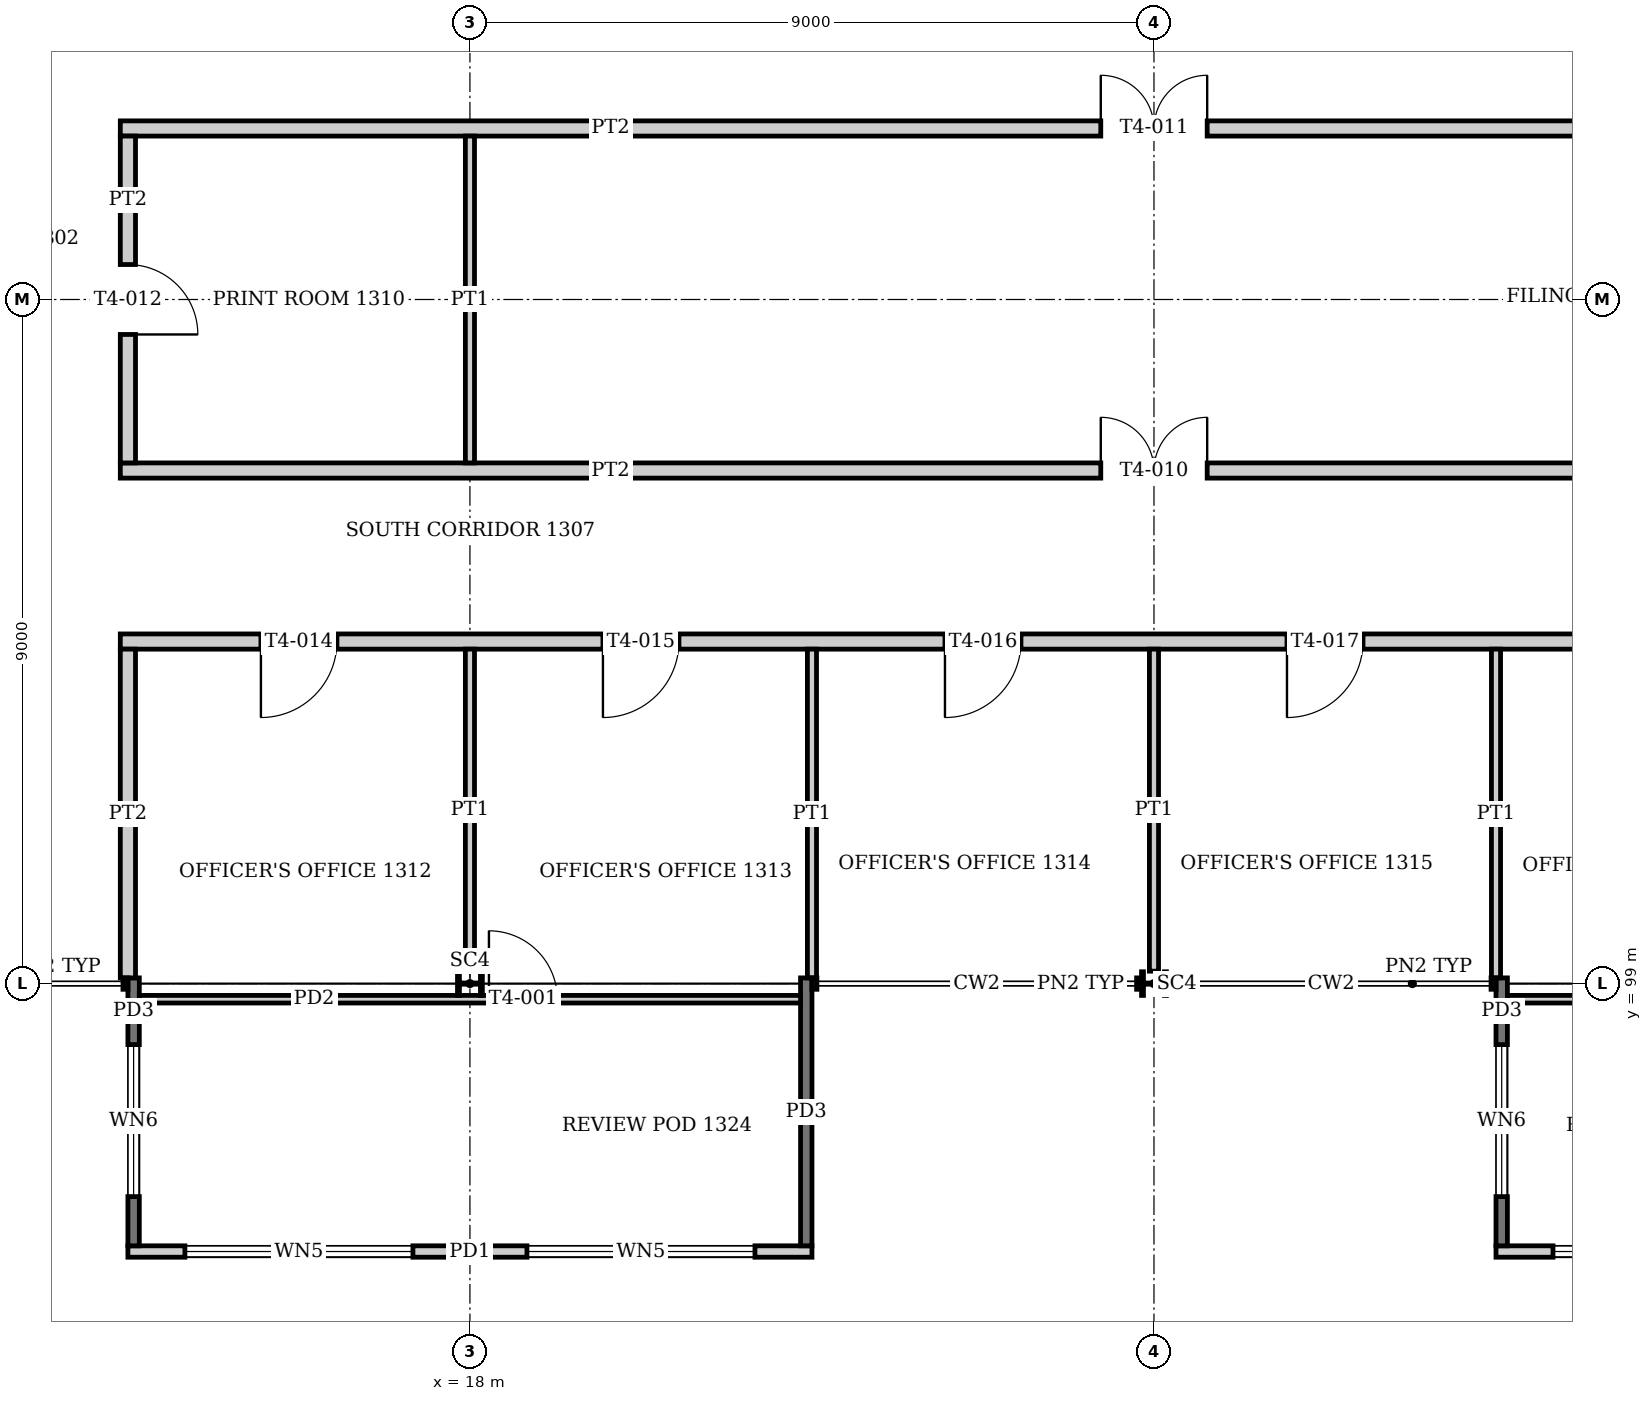
"""IFC4 building model, lengths in metres.
Left out: names, types, materials, properties, quantities, classifications, styles, units other than length and angle.
Written with IfcOpenShell. Run it as: python <this file> out.ifc"""

import sys

from ifc_helpers import new_model, si_unit, direction, frame, frame_2d, origin, origin_2d, place, context, subcontext, project, spatial, rectangle, i_section, extrude, element, fill, save


model = new_model("IFC4")
c1 = context("Model", 3, precision=1e-05, world=origin(), true_north=direction((0.0, 1.0)))
c2 = subcontext(c1, "Body", "Model", "MODEL_VIEW")
j1 = project(units=[si_unit("LENGTHUNIT", "METRE"), si_unit("PLANEANGLEUNIT", "RADIAN")], contexts=[c1])
p1 = place(None, origin())
s1 = spatial("IfcSite", under=j1, at=p1, CompositionType="ELEMENT")
p2 = place(p1, origin())
s2 = spatial("IfcBuilding", under=s1, at=p2, CompositionType="ELEMENT")
p3 = place(p2, frame((0.0, 0.0, 55.2)))
s3 = spatial("IfcBuildingStorey", under=s2, at=p3, CompositionType="ELEMENT", Elevation=55.2)
for number, where, z_axis, x_axis in (
    (1, (18.0, 99.0, 0.0), (0.0, 0.0, 1.0), (0.0, 1.0, 0.0)),
    (2, (27.0, 99.0, 0.0), (0.0, 0.0, 1.0), (0.0, 1.0, 0.0)),
):
    element("IfcColumn", number, at=place(p3, frame(where, z_axis=z_axis, x_axis=x_axis)), inside=s3, PredefinedType="COLUMN", context=c2, shape_type="SweptSolid", body=[
        extrude(i_section(OverallWidth=0.311, OverallDepth=0.327, WebThickness=0.016, FlangeThickness=0.025, at=origin_2d()), origin(), (0.0, 0.0, 1.0), 4.0),
    ])
p4 = place(p3, frame((13.5, 95.475, 0.0), z_axis=(0.0, 0.0, 1.0), x_axis=(1.0, 0.0, 0.0)))
e3 = element("IfcWall", 3, at=p4, inside=s3, PredefinedType="SOLIDWALL", context=c2, shape_type="SweptSolid", body=[
    extrude(rectangle(XDim=9.0, YDim=0.15, at=frame_2d((4.5, 0.0))), origin(), (0.0, 0.0, 1.0), 2.6),
])
p5 = place(p4, frame((0.75, 0.0, 0.9)))
e4 = element("IfcOpeningElement", 4, at=p5, cuts=e3, PredefinedType="OPENING", context=c2, shape_type="SweptSolid", body=[
    extrude(rectangle(XDim=3.0, YDim=1.4, at=frame_2d((1.5, 0.7))), frame((0.0, 0.085, 0.0), z_axis=(0.0, -1.0, 0.0), x_axis=(1.0, 0.0, 0.0)), (0.0, 0.0, 1.0), 0.17),
])
p6 = place(p4, frame((5.25, 0.0, 0.9)))
e5 = element("IfcOpeningElement", 5, at=p6, cuts=e3, PredefinedType="OPENING", context=c2, shape_type="SweptSolid", body=[
    extrude(rectangle(XDim=3.0, YDim=1.4, at=frame_2d((1.5, 0.7))), frame((0.0, 0.085, 0.0), z_axis=(0.0, -1.0, 0.0), x_axis=(1.0, 0.0, 0.0)), (0.0, 0.0, 1.0), 0.17),
])
p7 = place(p3, frame((13.575, 95.55, -0.15), z_axis=(0.0, 0.0, 1.0), x_axis=(0.0, 1.0, 0.0)))
e6 = element("IfcWall", 6, at=p7, inside=s3, PredefinedType="SOLIDWALL", context=c2, shape_type="SweptSolid", body=[
    extrude(rectangle(XDim=3.525, YDim=0.15, at=frame_2d((1.762, 0.0))), origin(), (0.0, 0.0, 1.0), 2.75),
])
p8 = place(p7, frame((0.647, 0.0, 1.05)))
e7 = element("IfcOpeningElement", 7, at=p8, cuts=e6, PredefinedType="OPENING", context=c2, shape_type="SweptSolid", body=[
    extrude(rectangle(XDim=2.0, YDim=1.4, at=frame_2d((1.0, 0.7))), frame((0.0, 0.085, 0.0), z_axis=(0.0, -1.0, 0.0), x_axis=(1.0, 0.0, 0.0)), (0.0, 0.0, 1.0), 0.17),
])
p9 = place(p3, frame((22.425, 95.55, -0.15), z_axis=(0.0, 0.0, 1.0), x_axis=(0.0, 1.0, 0.0)))
e8 = element("IfcWall", 8, at=p9, inside=s3, PredefinedType="SOLIDWALL", context=c2, shape_type="SweptSolid", body=[
    extrude(rectangle(XDim=3.525, YDim=0.15, at=frame_2d((1.762, 0.0))), origin(), (0.0, 0.0, 1.0), 2.75),
])
p10 = place(p3, frame((13.65, 98.794, 0.0), z_axis=(0.0, 0.0, 1.0), x_axis=(1.0, 0.0, 0.0)))
e9 = element("IfcWall", 9, at=p10, inside=s3, PredefinedType="PARTITIONING", context=c2, shape_type="SweptSolid", body=[
    extrude(rectangle(XDim=8.7, YDim=0.1, at=frame_2d((4.35, 0.0))), origin(), (0.0, 0.0, 1.0), 2.6),
])
p11 = place(p10, frame((4.6, 0.0, 0.0)))
e10 = element("IfcOpeningElement", 10, at=p11, cuts=e9, PredefinedType="OPENING", context=c2, shape_type="SweptSolid", body=[
    extrude(rectangle(XDim=0.9, YDim=2.1, at=frame_2d((0.45, 1.05))), frame((0.0, 0.06, 0.0), z_axis=(0.0, -1.0, 0.0), x_axis=(1.0, 0.0, 0.0)), (0.0, 0.0, 1.0), 0.12),
])
p12 = place(p3, frame((31.5, 95.475, 0.0), z_axis=(0.0, 0.0, 1.0), x_axis=(1.0, 0.0, 0.0)))
e11 = element("IfcWall", 11, at=p12, inside=s3, PredefinedType="SOLIDWALL", context=c2, shape_type="SweptSolid", body=[
    extrude(rectangle(XDim=9.0, YDim=0.15, at=frame_2d((4.5, 0.0))), origin(), (0.0, 0.0, 1.0), 2.6),
])
p13 = place(p12, frame((0.75, 0.0, 0.9)))
e12 = element("IfcOpeningElement", 12, at=p13, cuts=e11, PredefinedType="OPENING", context=c2, shape_type="SweptSolid", body=[
    extrude(rectangle(XDim=3.0, YDim=1.4, at=frame_2d((1.5, 0.7))), frame((0.0, 0.085, 0.0), z_axis=(0.0, -1.0, 0.0), x_axis=(1.0, 0.0, 0.0)), (0.0, 0.0, 1.0), 0.17),
])
p14 = place(p12, frame((5.25, 0.0, 0.9)))
e13 = element("IfcOpeningElement", 13, at=p14, cuts=e11, PredefinedType="OPENING", context=c2, shape_type="SweptSolid", body=[
    extrude(rectangle(XDim=3.0, YDim=1.4, at=frame_2d((1.5, 0.7))), frame((0.0, 0.085, 0.0), z_axis=(0.0, -1.0, 0.0), x_axis=(1.0, 0.0, 0.0)), (0.0, 0.0, 1.0), 0.17),
])
p15 = place(p3, frame((31.575, 95.55, -0.15), z_axis=(0.0, 0.0, 1.0), x_axis=(0.0, 1.0, 0.0)))
e14 = element("IfcWall", 14, at=p15, inside=s3, PredefinedType="SOLIDWALL", context=c2, shape_type="SweptSolid", body=[
    extrude(rectangle(XDim=3.525, YDim=0.15, at=frame_2d((1.762, 0.0))), origin(), (0.0, 0.0, 1.0), 2.75),
])
p16 = place(p15, frame((0.647, 0.0, 1.05)))
e15 = element("IfcOpeningElement", 15, at=p16, cuts=e14, PredefinedType="OPENING", context=c2, shape_type="SweptSolid", body=[
    extrude(rectangle(XDim=2.0, YDim=1.4, at=frame_2d((1.0, 0.7))), frame((0.0, 0.085, 0.0), z_axis=(0.0, -1.0, 0.0), x_axis=(1.0, 0.0, 0.0)), (0.0, 0.0, 1.0), 0.17),
])
p17 = place(p3, frame((31.65, 98.794, 0.0), z_axis=(0.0, 0.0, 1.0), x_axis=(1.0, 0.0, 0.0)))
e16 = element("IfcWall", 16, at=p17, inside=s3, PredefinedType="PARTITIONING", context=c2, shape_type="SweptSolid", body=[
    extrude(rectangle(XDim=8.7, YDim=0.1, at=frame_2d((4.35, 0.0))), origin(), (0.0, 0.0, 1.0), 2.6),
])
p18 = place(p17, frame((4.6, 0.0, 0.0)))
e17 = element("IfcOpeningElement", 17, at=p18, cuts=e16, PredefinedType="OPENING", context=c2, shape_type="SweptSolid", body=[
    extrude(rectangle(XDim=0.9, YDim=2.1, at=frame_2d((0.45, 1.05))), frame((0.0, 0.06, 0.0), z_axis=(0.0, -1.0, 0.0), x_axis=(1.0, 0.0, 0.0)), (0.0, 0.0, 1.0), 0.12),
])
p19 = place(p3, frame((13.4, 103.5, 0.0), z_axis=(0.0, 0.0, 1.0), x_axis=(1.0, 0.0, 0.0)))
e18 = element("IfcWall", 18, at=p19, inside=s3, PredefinedType="PARTITIONING", context=c2, shape_type="SweptSolid", body=[
    extrude(rectangle(XDim=27.2, YDim=0.2, at=frame_2d((13.6, 0.0))), origin(), (0.0, 0.0, 1.0), 3.05),
])
p20 = place(p19, frame((1.85, 0.0, 0.0)))
e19 = element("IfcOpeningElement", 19, at=p20, cuts=e18, PredefinedType="OPENING", context=c2, shape_type="SweptSolid", body=[
    extrude(rectangle(XDim=1.0, YDim=2.1, at=frame_2d((0.5, 1.05))), frame((0.0, 0.11, 0.0), z_axis=(0.0, -1.0, 0.0), x_axis=(1.0, 0.0, 0.0)), (0.0, 0.0, 1.0), 0.22),
])
p21 = place(p19, frame((6.35, 0.0, 0.0)))
e20 = element("IfcOpeningElement", 20, at=p21, cuts=e18, PredefinedType="OPENING", context=c2, shape_type="SweptSolid", body=[
    extrude(rectangle(XDim=1.0, YDim=2.1, at=frame_2d((0.5, 1.05))), frame((0.0, 0.11, 0.0), z_axis=(0.0, -1.0, 0.0), x_axis=(1.0, 0.0, 0.0)), (0.0, 0.0, 1.0), 0.22),
])
p22 = place(p19, frame((10.85, 0.0, 0.0)))
e21 = element("IfcOpeningElement", 21, at=p22, cuts=e18, PredefinedType="OPENING", context=c2, shape_type="SweptSolid", body=[
    extrude(rectangle(XDim=1.0, YDim=2.1, at=frame_2d((0.5, 1.05))), frame((0.0, 0.11, 0.0), z_axis=(0.0, -1.0, 0.0), x_axis=(1.0, 0.0, 0.0)), (0.0, 0.0, 1.0), 0.22),
])
p23 = place(p19, frame((15.35, 0.0, 0.0)))
e22 = element("IfcOpeningElement", 22, at=p23, cuts=e18, PredefinedType="OPENING", context=c2, shape_type="SweptSolid", body=[
    extrude(rectangle(XDim=1.0, YDim=2.1, at=frame_2d((0.5, 1.05))), frame((0.0, 0.11, 0.0), z_axis=(0.0, -1.0, 0.0), x_axis=(1.0, 0.0, 0.0)), (0.0, 0.0, 1.0), 0.22),
])
p24 = place(p19, frame((19.85, 0.0, 0.0)))
e23 = element("IfcOpeningElement", 23, at=p24, cuts=e18, PredefinedType="OPENING", context=c2, shape_type="SweptSolid", body=[
    extrude(rectangle(XDim=1.0, YDim=2.1, at=frame_2d((0.5, 1.05))), frame((0.0, 0.11, 0.0), z_axis=(0.0, -1.0, 0.0), x_axis=(1.0, 0.0, 0.0)), (0.0, 0.0, 1.0), 0.22),
])
p25 = place(p19, frame((24.45, 0.0, 0.0)))
e24 = element("IfcOpeningElement", 24, at=p25, cuts=e18, PredefinedType="OPENING", context=c2, shape_type="SweptSolid", body=[
    extrude(rectangle(XDim=0.8, YDim=2.1, at=frame_2d((0.4, 1.05))), frame((0.0, 0.11, 0.0), z_axis=(0.0, -1.0, 0.0), x_axis=(1.0, 0.0, 0.0)), (0.0, 0.0, 1.0), 0.22),
])
p26 = place(p3, frame((13.4, 105.75, 0.0), z_axis=(0.0, 0.0, 1.0), x_axis=(1.0, 0.0, 0.0)))
e25 = element("IfcWall", 25, at=p26, inside=s3, PredefinedType="PARTITIONING", context=c2, shape_type="SweptSolid", body=[
    extrude(rectangle(XDim=27.2, YDim=0.2, at=frame_2d((13.6, 0.0))), origin(), (0.0, 0.0, 1.0), 3.05),
])
p27 = place(p26, frame((12.9, 0.0, 0.0)))
e26 = element("IfcOpeningElement", 26, at=p27, cuts=e25, PredefinedType="OPENING", context=c2, shape_type="SweptSolid", body=[
    extrude(rectangle(XDim=1.4, YDim=2.1, at=frame_2d((0.7, 1.05))), frame((0.0, 0.11, 0.0), z_axis=(0.0, -1.0, 0.0), x_axis=(1.0, 0.0, 0.0)), (0.0, 0.0, 1.0), 0.22),
])
p28 = place(p3, frame((13.4, 110.25, 0.0), z_axis=(0.0, 0.0, 1.0), x_axis=(1.0, 0.0, 0.0)))
e27 = element("IfcWall", 27, at=p28, inside=s3, PredefinedType="PARTITIONING", context=c2, shape_type="SweptSolid", body=[
    extrude(rectangle(XDim=27.2, YDim=0.2, at=frame_2d((13.6, 0.0))), origin(), (0.0, 0.0, 1.0), 3.05),
])
p29 = place(p28, frame((12.9, 0.0, 0.0)))
e28 = element("IfcOpeningElement", 28, at=p29, cuts=e27, PredefinedType="OPENING", context=c2, shape_type="SweptSolid", body=[
    extrude(rectangle(XDim=1.4, YDim=2.1, at=frame_2d((0.7, 1.05))), frame((0.0, 0.11, 0.0), z_axis=(0.0, -1.0, 0.0), x_axis=(1.0, 0.0, 0.0)), (0.0, 0.0, 1.0), 0.22),
])
p30 = place(p3, frame((13.5, 99.075, 0.0), z_axis=(0.0, 0.0, 1.0), x_axis=(0.0, 1.0, 0.0)))
e29 = element("IfcWall", 29, at=p30, inside=s3, PredefinedType="PARTITIONING", context=c2, shape_type="SweptSolid", body=[
    extrude(rectangle(XDim=4.325, YDim=0.2, at=frame_2d((2.163, 0.0))), origin(), (0.0, 0.0, 1.0), 3.05),
])
p31 = place(p3, frame((13.5, 105.85, 0.0), z_axis=(0.0, 0.0, 1.0), x_axis=(0.0, 1.0, 0.0)))
e30 = element("IfcWall", 30, at=p31, inside=s3, PredefinedType="PARTITIONING", context=c2, shape_type="SweptSolid", body=[
    extrude(rectangle(XDim=4.3, YDim=0.2, at=frame_2d((2.15, 0.0))), origin(), (0.0, 0.0, 1.0), 3.05),
])
p32 = place(p31, frame((1.69, 0.0, 0.0)))
e31 = element("IfcOpeningElement", 31, at=p32, cuts=e30, PredefinedType="OPENING", context=c2, shape_type="SweptSolid", body=[
    extrude(rectangle(XDim=0.92, YDim=2.1, at=frame_2d((0.46, 1.05))), frame((0.0, 0.11, 0.0), z_axis=(0.0, -1.0, 0.0), x_axis=(1.0, 0.0, 0.0)), (0.0, 0.0, 1.0), 0.22),
])
p33 = place(p3, frame((18.0, 99.164, 0.0), z_axis=(0.0, 0.0, 1.0), x_axis=(0.0, 1.0, 0.0)))
e32 = element("IfcWall", 32, at=p33, inside=s3, PredefinedType="PARTITIONING", context=c2, shape_type="SweptSolid", body=[
    extrude(rectangle(XDim=4.236, YDim=0.12, at=frame_2d((2.118, 0.0))), origin(), (0.0, 0.0, 1.0), 3.05),
])
p34 = place(p3, frame((18.0, 105.85, 0.0), z_axis=(0.0, 0.0, 1.0), x_axis=(0.0, 1.0, 0.0)))
e33 = element("IfcWall", 33, at=p34, inside=s3, PredefinedType="PARTITIONING", context=c2, shape_type="SweptSolid", body=[
    extrude(rectangle(XDim=4.3, YDim=0.12, at=frame_2d((2.15, 0.0))), origin(), (0.0, 0.0, 1.0), 3.05),
])
p35 = place(p3, frame((22.5, 99.075, 0.0), z_axis=(0.0, 0.0, 1.0), x_axis=(0.0, 1.0, 0.0)))
e34 = element("IfcWall", 34, at=p35, inside=s3, PredefinedType="PARTITIONING", context=c2, shape_type="SweptSolid", body=[
    extrude(rectangle(XDim=4.325, YDim=0.12, at=frame_2d((2.163, 0.0))), origin(), (0.0, 0.0, 1.0), 3.05),
])
p36 = place(p3, frame((27.0, 99.164, 0.0), z_axis=(0.0, 0.0, 1.0), x_axis=(0.0, 1.0, 0.0)))
e35 = element("IfcWall", 35, at=p36, inside=s3, PredefinedType="PARTITIONING", context=c2, shape_type="SweptSolid", body=[
    extrude(rectangle(XDim=4.236, YDim=0.12, at=frame_2d((2.118, 0.0))), origin(), (0.0, 0.0, 1.0), 3.05),
])
p37 = place(p3, frame((31.5, 99.075, 0.0), z_axis=(0.0, 0.0, 1.0), x_axis=(0.0, 1.0, 0.0)))
e36 = element("IfcWall", 36, at=p37, inside=s3, PredefinedType="PARTITIONING", context=c2, shape_type="SweptSolid", body=[
    extrude(rectangle(XDim=4.325, YDim=0.12, at=frame_2d((2.163, 0.0))), origin(), (0.0, 0.0, 1.0), 3.05),
])
p38 = place(p5, origin())
e37 = element("IfcWindow", 37, at=p38, inside=s3, PartitioningType="SINGLE_PANEL", PredefinedType="WINDOW", context=c2, shape_type="SweptSolid", body=[
    extrude(rectangle(XDim=3.0, YDim=1.4, at=frame_2d((1.5, 0.7))), frame((0.0, 0.03, 0.0), z_axis=(0.0, -1.0, 0.0), x_axis=(1.0, 0.0, 0.0)), (0.0, 0.0, 1.0), 0.06),
])
fill(e4, e37)
p39 = place(p6, origin())
e38 = element("IfcWindow", 38, at=p39, inside=s3, PartitioningType="SINGLE_PANEL", PredefinedType="WINDOW", context=c2, shape_type="SweptSolid", body=[
    extrude(rectangle(XDim=3.0, YDim=1.4, at=frame_2d((1.5, 0.7))), frame((0.0, 0.03, 0.0), z_axis=(0.0, -1.0, 0.0), x_axis=(1.0, 0.0, 0.0)), (0.0, 0.0, 1.0), 0.06),
])
fill(e5, e38)
p40 = place(p8, origin())
e39 = element("IfcWindow", 39, at=p40, inside=s3, PartitioningType="SINGLE_PANEL", PredefinedType="WINDOW", context=c2, shape_type="SweptSolid", body=[
    extrude(rectangle(XDim=2.0, YDim=1.4, at=frame_2d((1.0, 0.7))), frame((0.0, 0.03, 0.0), z_axis=(0.0, -1.0, 0.0), x_axis=(1.0, 0.0, 0.0)), (0.0, 0.0, 1.0), 0.06),
])
fill(e7, e39)
p41 = place(p11, origin())
e40 = element("IfcDoor", 40, at=p41, inside=s3, OperationType="SINGLE_SWING_LEFT", PredefinedType="DOOR", context=c2, shape_type="SweptSolid", body=[
    extrude(rectangle(XDim=0.9, YDim=2.1, at=frame_2d((0.45, 1.05))), frame((0.0, 0.025, 0.0), z_axis=(0.0, -1.0, 0.0), x_axis=(1.0, 0.0, 0.0)), (0.0, 0.0, 1.0), 0.05),
])
fill(e10, e40)
p42 = place(p13, origin())
e41 = element("IfcWindow", 41, at=p42, inside=s3, PartitioningType="SINGLE_PANEL", PredefinedType="WINDOW", context=c2, shape_type="SweptSolid", body=[
    extrude(rectangle(XDim=3.0, YDim=1.4, at=frame_2d((1.5, 0.7))), frame((0.0, 0.03, 0.0), z_axis=(0.0, -1.0, 0.0), x_axis=(1.0, 0.0, 0.0)), (0.0, 0.0, 1.0), 0.06),
])
fill(e12, e41)
p43 = place(p16, origin())
e42 = element("IfcWindow", 42, at=p43, inside=s3, PartitioningType="SINGLE_PANEL", PredefinedType="WINDOW", context=c2, shape_type="SweptSolid", body=[
    extrude(rectangle(XDim=2.0, YDim=1.4, at=frame_2d((1.0, 0.7))), frame((0.0, 0.03, 0.0), z_axis=(0.0, -1.0, 0.0), x_axis=(1.0, 0.0, 0.0)), (0.0, 0.0, 1.0), 0.06),
])
fill(e15, e42)
p44 = place(p27, origin())
e43 = element("IfcDoor", 43, at=p44, inside=s3, OperationType="DOUBLE_DOOR_SINGLE_SWING", PredefinedType="DOOR", context=c2, shape_type="SweptSolid", body=[
    extrude(rectangle(XDim=1.4, YDim=2.1, at=frame_2d((0.7, 1.05))), frame((0.0, 0.025, 0.0), z_axis=(0.0, -1.0, 0.0), x_axis=(1.0, 0.0, 0.0)), (0.0, 0.0, 1.0), 0.05),
])
fill(e26, e43)
p45 = place(p29, origin())
e44 = element("IfcDoor", 44, at=p45, inside=s3, OperationType="DOUBLE_DOOR_SINGLE_SWING", PredefinedType="DOOR", context=c2, shape_type="SweptSolid", body=[
    extrude(rectangle(XDim=1.4, YDim=2.1, at=frame_2d((0.7, 1.05))), frame((0.0, 0.025, 0.0), z_axis=(0.0, -1.0, 0.0), x_axis=(1.0, 0.0, 0.0)), (0.0, 0.0, 1.0), 0.05),
])
fill(e28, e44)
p46 = place(p32, frame((0.92, 0.0, 0.0), z_axis=(0.0, 0.0, 1.0), x_axis=(-1.0, 0.0, 0.0)))
e45 = element("IfcDoor", 45, at=p46, inside=s3, OperationType="SINGLE_SWING_RIGHT", PredefinedType="DOOR", context=c2, shape_type="SweptSolid", body=[
    extrude(rectangle(XDim=0.92, YDim=2.1, at=frame_2d((0.46, 1.05))), frame((0.0, 0.025, 0.0), z_axis=(0.0, -1.0, 0.0), x_axis=(1.0, 0.0, 0.0)), (0.0, 0.0, 1.0), 0.05),
])
fill(e31, e45)
p47 = place(p20, frame((1.0, 0.0, 0.0), z_axis=(0.0, 0.0, 1.0), x_axis=(-1.0, 0.0, 0.0)))
e46 = element("IfcDoor", 46, at=p47, inside=s3, OperationType="SINGLE_SWING_RIGHT", PredefinedType="DOOR", context=c2, shape_type="SweptSolid", body=[
    extrude(rectangle(XDim=1.0, YDim=2.1, at=frame_2d((0.5, 1.05))), frame((0.0, 0.025, 0.0), z_axis=(0.0, -1.0, 0.0), x_axis=(1.0, 0.0, 0.0)), (0.0, 0.0, 1.0), 0.05),
])
fill(e19, e46)
p48 = place(p21, frame((1.0, 0.0, 0.0), z_axis=(0.0, 0.0, 1.0), x_axis=(-1.0, 0.0, 0.0)))
e47 = element("IfcDoor", 47, at=p48, inside=s3, OperationType="SINGLE_SWING_RIGHT", PredefinedType="DOOR", context=c2, shape_type="SweptSolid", body=[
    extrude(rectangle(XDim=1.0, YDim=2.1, at=frame_2d((0.5, 1.05))), frame((0.0, 0.025, 0.0), z_axis=(0.0, -1.0, 0.0), x_axis=(1.0, 0.0, 0.0)), (0.0, 0.0, 1.0), 0.05),
])
fill(e20, e47)
p49 = place(p22, frame((1.0, 0.0, 0.0), z_axis=(0.0, 0.0, 1.0), x_axis=(-1.0, 0.0, 0.0)))
e48 = element("IfcDoor", 48, at=p49, inside=s3, OperationType="SINGLE_SWING_RIGHT", PredefinedType="DOOR", context=c2, shape_type="SweptSolid", body=[
    extrude(rectangle(XDim=1.0, YDim=2.1, at=frame_2d((0.5, 1.05))), frame((0.0, 0.025, 0.0), z_axis=(0.0, -1.0, 0.0), x_axis=(1.0, 0.0, 0.0)), (0.0, 0.0, 1.0), 0.05),
])
fill(e21, e48)
p50 = place(p23, frame((1.0, 0.0, 0.0), z_axis=(0.0, 0.0, 1.0), x_axis=(-1.0, 0.0, 0.0)))
e49 = element("IfcDoor", 49, at=p50, inside=s3, OperationType="SINGLE_SWING_RIGHT", PredefinedType="DOOR", context=c2, shape_type="SweptSolid", body=[
    extrude(rectangle(XDim=1.0, YDim=2.1, at=frame_2d((0.5, 1.05))), frame((0.0, 0.025, 0.0), z_axis=(0.0, -1.0, 0.0), x_axis=(1.0, 0.0, 0.0)), (0.0, 0.0, 1.0), 0.05),
])
fill(e22, e49)
save(model, sys.argv[1])
